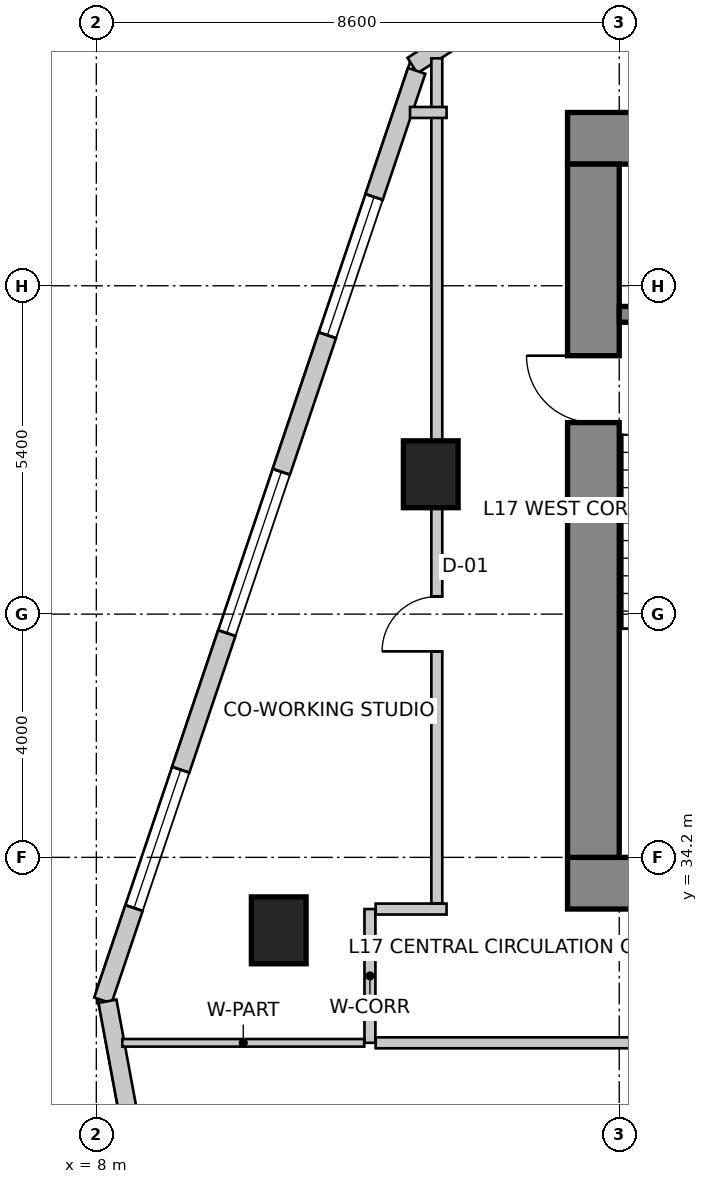
"""IFC4 building model, lengths in metres.
Left out: names, types, materials, properties, quantities, classifications, styles, units other than length and angle.
Written with IfcOpenShell. Run it as: python <this file> out.ifc"""

import sys

from ifc_helpers import new_model, si_unit, direction, frame, frame_2d, origin, origin_2d, place, context, subcontext, project, spatial, rectangle, extrude, source, transform, mapped, element, fill, save


model = new_model("IFC4")
c1 = context("Model", 3, precision=1e-05, world=origin(), true_north=direction((0.0, 1.0)))
c2 = subcontext(c1, "Body", "Model", "MODEL_VIEW")
j1 = project(units=[si_unit("LENGTHUNIT", "METRE"), si_unit("PLANEANGLEUNIT", "RADIAN")], contexts=[c1])
p1 = place(None, origin())
s1 = spatial("IfcSite", under=j1, at=p1, CompositionType="ELEMENT")
p2 = place(p1, origin())
s2 = spatial("IfcBuilding", under=s1, at=p2, CompositionType="ELEMENT")
p3 = place(p2, frame((0.0, 0.0, 71.0)))
s3 = spatial("IfcBuildingStorey", under=s2, at=p3, CompositionType="ELEMENT", Elevation=71.0)
p4 = place(p3, frame((15.75, 46.025, 0.0), z_axis=(0.0, 0.0, 1.0), x_axis=(1.0, 0.0, 0.0)))
e1 = element("IfcWall", 1, at=p4, inside=s3, PredefinedType="SHEAR", context=c2, shape_type="SweptSolid", body=[
    extrude(rectangle(XDim=16.1, YDim=0.85, at=frame_2d((8.05, 0.0))), origin(), (0.0, 0.0, 1.0), 4.0),
])
p5 = place(p3, frame((15.75, 33.775, 0.0), z_axis=(0.0, 0.0, 1.0), x_axis=(1.0, 0.0, 0.0)))
e2 = element("IfcWall", 2, at=p5, inside=s3, PredefinedType="SHEAR", context=c2, shape_type="SweptSolid", body=[
    extrude(rectangle(XDim=16.1, YDim=0.85, at=frame_2d((8.05, 0.0))), origin(), (0.0, 0.0, 1.0), 4.0),
])
m1 = source(origin(), c2, "Body", "SweptSolid", [
    extrude(rectangle(XDim=1.3, YDim=2.15, at=frame_2d((0.65, 1.075))), frame((0.0, 0.435, 0.0), z_axis=(0.0, -1.0, 0.0), x_axis=(1.0, 0.0, 0.0)), (0.0, 0.0, 1.0), 0.87),
])
p6 = place(p5, frame((10.18, 0.0, 0.0)))
e3 = element("IfcOpeningElement", 3, at=p6, cuts=e2, PredefinedType="OPENING", context=c2, shape_type="MappedRepresentation", body=[
    mapped(m1, transform((0.0, 0.0, 0.0), scale=1.0)),
])
p7 = place(p3, frame((16.175, 34.2, 0.0), z_axis=(0.0, 0.0, 1.0), x_axis=(0.0, 1.0, 0.0)))
e4 = element("IfcWall", 4, at=p7, inside=s3, PredefinedType="SHEAR", context=c2, shape_type="SweptSolid", body=[
    extrude(rectangle(XDim=11.4, YDim=0.85, at=frame_2d((5.7, 0.0))), origin(), (0.0, 0.0, 1.0), 4.0),
])
m2 = source(origin(), c2, "Body", "SweptSolid", [
    extrude(rectangle(XDim=1.1, YDim=2.15, at=frame_2d((0.55, 1.075))), frame((0.0, 0.435, 0.0), z_axis=(0.0, -1.0, 0.0), x_axis=(1.0, 0.0, 0.0)), (0.0, 0.0, 1.0), 0.87),
])
p8 = place(p7, frame((7.15, 0.0, 0.0)))
e5 = element("IfcOpeningElement", 5, at=p8, cuts=e4, PredefinedType="OPENING", context=c2, shape_type="MappedRepresentation", body=[
    mapped(m2, transform((0.0, 0.0, 0.0), scale=1.0)),
])
p9 = place(p3, frame((16.6, 43.13, 0.0), z_axis=(0.0, 0.0, 1.0), x_axis=(1.0, 0.0, 0.0)))
e6 = element("IfcWall", 6, at=p9, inside=s3, PredefinedType="SHEAR", context=c2, shape_type="SweptSolid", body=[
    extrude(rectangle(XDim=3.5, YDim=0.26, at=frame_2d((1.75, 0.0))), origin(), (0.0, 0.0, 1.0), 4.0),
])
m3 = source(origin(), c2, "Body", "SweptSolid", [
    extrude(rectangle(XDim=0.9, YDim=1.1, at=origin_2d()), origin(), (0.0, 0.0, 1.0), 4.0),
])
for number, where, z_axis, x_axis in (
    (7, (11.0, 33.0, 0.0), (0.0, 0.0, 1.0), (1.0, 0.0, 0.0)),
    (8, (13.5, 40.5, 0.0), (0.0, 0.0, 1.0), (1.0, 0.0, 0.0)),
):
    element("IfcColumn", number, at=place(p3, frame(where, z_axis=z_axis, x_axis=x_axis)), inside=s3, PredefinedType="COLUMN", context=c2, shape_type="MappedRepresentation", body=[
        mapped(m3, transform((0.0, 0.0, 0.0), scale=1.0)),
    ])
p10 = place(p3, frame((21.875, 52.742, 0.0), z_axis=(0.0, 0.0, 1.0), x_axis=(-0.843662465249, -0.536873956092, 0.0)))
e9 = element("IfcWall", 9, at=p10, inside=s3, PredefinedType="SOLIDWALL", context=c2, shape_type="SweptSolid", body=[
    extrude(rectangle(XDim=10.284, YDim=0.3, at=frame_2d((5.142, 0.0))), origin(), (0.0, 0.0, 1.0), 3.75),
])
m4 = source(origin(), c2, "Body", "SweptSolid", [
    extrude(rectangle(XDim=1.2, YDim=1.6, at=frame_2d((0.6, 0.8))), frame((0.0, 0.16, 0.0), z_axis=(0.0, -1.0, 0.0), x_axis=(1.0, 0.0, 0.0)), (0.0, 0.0, 1.0), 0.32),
])
p11 = place(p10, frame((0.479, 0.0, 0.85)))
e10 = element("IfcOpeningElement", 10, at=p11, cuts=e9, PredefinedType="OPENING", context=c2, shape_type="MappedRepresentation", body=[
    mapped(m4, transform((0.0, 0.0, 0.0), scale=1.0)),
])
m5 = source(origin(), c2, "Body", "SweptSolid", [
    extrude(rectangle(XDim=2.8, YDim=2.4, at=frame_2d((1.4, 1.2))), frame((0.0, 0.16, 0.0), z_axis=(0.0, -1.0, 0.0), x_axis=(1.0, 0.0, 0.0)), (0.0, 0.0, 1.0), 0.32),
])
p12 = place(p10, frame((3.342, 0.0, 0.85)))
e11 = element("IfcOpeningElement", 11, at=p12, cuts=e9, PredefinedType="OPENING", context=c2, shape_type="MappedRepresentation", body=[
    mapped(m5, transform((0.0, 0.0, 0.0), scale=1.0)),
])
m6 = source(origin(), c2, "Body", "SweptSolid", [
    extrude(rectangle(XDim=1.8, YDim=2.1, at=frame_2d((0.9, 1.05))), frame((0.0, 0.16, 0.0), z_axis=(0.0, -1.0, 0.0), x_axis=(1.0, 0.0, 0.0)), (0.0, 0.0, 1.0), 0.32),
])
p13 = place(p10, frame((7.753, 0.0, 0.85)))
e12 = element("IfcOpeningElement", 12, at=p13, cuts=e9, PredefinedType="OPENING", context=c2, shape_type="MappedRepresentation", body=[
    mapped(m6, transform((0.0, 0.0, 0.0), scale=1.0)),
])
p14 = place(p3, frame((13.269, 47.134, 0.0), z_axis=(0.0, 0.0, 1.0), x_axis=(-0.319920423265, -0.947444416722, 0.0)))
e13 = element("IfcWall", 13, at=p14, inside=s3, PredefinedType="SOLIDWALL", context=c2, shape_type="SweptSolid", body=[
    extrude(rectangle(XDim=16.135, YDim=0.3, at=frame_2d((8.067, 0.0))), origin(), (0.0, 0.0, 1.0), 3.75),
])
m7 = source(origin(), c2, "Body", "SweptSolid", [
    extrude(rectangle(XDim=2.4, YDim=2.2, at=frame_2d((1.2, 1.1))), frame((0.0, 0.16, 0.0), z_axis=(0.0, -1.0, 0.0), x_axis=(1.0, 0.0, 0.0)), (0.0, 0.0, 1.0), 0.32),
])
p15 = place(p14, frame((2.188, 0.0, 0.85)))
e14 = element("IfcOpeningElement", 14, at=p15, cuts=e13, PredefinedType="OPENING", context=c2, shape_type="MappedRepresentation", body=[
    mapped(m7, transform((0.0, 0.0, 0.0), scale=1.0)),
])
p16 = place(p14, frame((6.959, 0.0, 0.85)))
e15 = element("IfcOpeningElement", 15, at=p16, cuts=e13, PredefinedType="OPENING", context=c2, shape_type="MappedRepresentation", body=[
    mapped(m5, transform((0.0, 0.0, 0.0), scale=1.0)),
])
p17 = place(p14, frame((12.13, 0.0, 0.85)))
e16 = element("IfcOpeningElement", 16, at=p17, cuts=e13, PredefinedType="OPENING", context=c2, shape_type="MappedRepresentation", body=[
    mapped(m7, transform((0.0, 0.0, 0.0), scale=1.0)),
])
p18 = place(p3, frame((8.183, 31.833, 0.0), z_axis=(0.0, 0.0, 1.0), x_axis=(0.18216364648, -0.983268226834, 0.0)))
e17 = element("IfcWall", 17, at=p18, inside=s3, PredefinedType="SOLIDWALL", context=c2, shape_type="SweptSolid", body=[
    extrude(rectangle(XDim=26.678, YDim=0.3, at=frame_2d((13.339, 0.0))), origin(), (0.0, 0.0, 1.0), 3.75),
])
m8 = source(origin(), c2, "Body", "SweptSolid", [
    extrude(rectangle(XDim=1.6, YDim=2.15, at=frame_2d((0.8, 1.075))), frame((0.0, 0.16, 0.0), z_axis=(0.0, -1.0, 0.0), x_axis=(1.0, 0.0, 0.0)), (0.0, 0.0, 1.0), 0.32),
])
p19 = place(p18, frame((9.427, 0.0, 0.0)))
e18 = element("IfcOpeningElement", 18, at=p19, cuts=e17, PredefinedType="OPENING", context=c2, shape_type="MappedRepresentation", body=[
    mapped(m8, transform((0.0, 0.0, 0.0), scale=1.0)),
])
p20 = place(p18, frame((3.642, 0.0, 0.85)))
e19 = element("IfcOpeningElement", 19, at=p20, cuts=e17, PredefinedType="OPENING", context=c2, shape_type="MappedRepresentation", body=[
    mapped(m5, transform((0.0, 0.0, 0.0), scale=1.0)),
])
p21 = place(p18, frame((13.647, 0.0, 0.85)))
e20 = element("IfcOpeningElement", 20, at=p21, cuts=e17, PredefinedType="OPENING", context=c2, shape_type="MappedRepresentation", body=[
    mapped(m5, transform((0.0, 0.0, 0.0), scale=1.0)),
])
p22 = place(p18, frame((18.372, 0.0, 0.85)))
e21 = element("IfcOpeningElement", 21, at=p22, cuts=e17, PredefinedType="OPENING", context=c2, shape_type="MappedRepresentation", body=[
    mapped(m7, transform((0.0, 0.0, 0.0), scale=1.0)),
])
p23 = place(p18, frame((22.696, 0.0, 0.85)))
e22 = element("IfcOpeningElement", 22, at=p23, cuts=e17, PredefinedType="OPENING", context=c2, shape_type="MappedRepresentation", body=[
    mapped(m5, transform((0.0, 0.0, 0.0), scale=1.0)),
])
p24 = place(p3, frame((12.5, 31.15, 0.0), z_axis=(0.0, 0.0, 1.0), x_axis=(0.0, 1.0, 0.0)))
e23 = element("IfcWall", 23, at=p24, inside=s3, PredefinedType="PARTITIONING", context=c2, shape_type="SweptSolid", body=[
    extrude(rectangle(XDim=2.2, YDim=0.18, at=frame_2d((1.1, 0.0))), origin(), (0.0, 0.0, 1.0), 3.434),
])
p25 = place(p3, frame((12.594, 33.35, 0.0), z_axis=(0.0, 0.0, 1.0), x_axis=(1.0, 0.0, 0.0)))
e24 = element("IfcWall", 24, at=p25, inside=s3, PredefinedType="PARTITIONING", context=c2, shape_type="SweptSolid", body=[
    extrude(rectangle(XDim=1.166, YDim=0.18, at=frame_2d((0.583, 0.0))), origin(), (0.0, 0.0, 1.0), 3.75),
])
p26 = place(p3, frame((26.76, 31.15, 0.0), z_axis=(0.0, 0.0, 1.0), x_axis=(-1.0, 0.0, 0.0)))
e25 = element("IfcWall", 25, at=p26, inside=s3, PredefinedType="PARTITIONING", context=c2, shape_type="SweptSolid", body=[
    extrude(rectangle(XDim=14.166, YDim=0.18, at=frame_2d((7.083, 0.0))), origin(), (0.0, 0.0, 1.0), 3.434),
])
m9 = source(origin(), c2, "Body", "SweptSolid", [
    extrude(rectangle(XDim=1.4, YDim=2.15, at=frame_2d((0.7, 1.075))), frame((0.0, 0.1, 0.0), z_axis=(0.0, -1.0, 0.0), x_axis=(1.0, 0.0, 0.0)), (0.0, 0.0, 1.0), 0.2),
])
p27 = place(p26, frame((6.323, 0.0, 0.0)))
e26 = element("IfcOpeningElement", 26, at=p27, cuts=e25, PredefinedType="OPENING", context=c2, shape_type="MappedRepresentation", body=[
    mapped(m9, transform((0.0, 0.0, 0.0), scale=1.0)),
])
p28 = place(p3, frame((13.6, 33.444, 0.0), z_axis=(0.0, 0.0, 1.0), x_axis=(0.0, 1.0, 0.0)))
e27 = element("IfcWall", 27, at=p28, inside=s3, PredefinedType="PARTITIONING", context=c2, shape_type="SweptSolid", body=[
    extrude(rectangle(XDim=13.896, YDim=0.18, at=frame_2d((6.948, 0.0))), origin(), (0.0, 0.0, 1.0), 2.892),
])
m10 = source(origin(), c2, "Body", "SweptSolid", [
    extrude(rectangle(XDim=0.9, YDim=2.15, at=frame_2d((0.45, 1.075))), frame((0.0, 0.1, 0.0), z_axis=(0.0, -1.0, 0.0), x_axis=(1.0, 0.0, 0.0)), (0.0, 0.0, 1.0), 0.2),
])
p29 = place(p28, frame((4.144, 0.0, 0.0)))
e28 = element("IfcOpeningElement", 28, at=p29, cuts=e27, PredefinedType="OPENING", context=c2, shape_type="MappedRepresentation", body=[
    mapped(m10, transform((0.0, 0.0, 0.0), scale=1.0)),
])
p30 = place(p3, frame((13.76, 46.45, 0.0), z_axis=(0.0, 0.0, 1.0), x_axis=(-1.0, 0.0, 0.0)))
e29 = element("IfcWall", 29, at=p30, inside=s3, PredefinedType="PARTITIONING", context=c2, shape_type="SweptSolid", body=[
    extrude(rectangle(XDim=0.601, YDim=0.18, at=frame_2d((0.301, 0.0))), origin(), (0.0, 0.0, 1.0), 3.75),
])
p31 = place(p3, frame((12.406, 31.15, 0.0), z_axis=(0.0, 0.0, 1.0), x_axis=(-1.0, 0.0, 0.0)))
e30 = element("IfcWall", 30, at=p31, inside=s3, PredefinedType="PARTITIONING", context=c2, shape_type="SweptSolid", body=[
    extrude(rectangle(XDim=3.979, YDim=0.125, at=frame_2d((1.99, 0.0))), origin(), (0.0, 0.0, 1.0), 2.892),
])
m11 = source(origin(), c2, "Body", "SweptSolid", [
    extrude(rectangle(XDim=2.4, YDim=2.2, at=frame_2d((1.2, 1.1))), frame((0.0, -0.015, 0.0), z_axis=(0.0, -1.0, 0.0), x_axis=(1.0, 0.0, 0.0)), (0.0, 0.0, 1.0), 0.06),
])
p32 = place(p15, origin())
e31 = element("IfcWindow", 31, at=p32, inside=s3, PartitioningType="SINGLE_PANEL", PredefinedType="WINDOW", context=c2, shape_type="MappedRepresentation", body=[
    mapped(m11, transform((0.0, 0.0, 0.0), scale=1.0)),
])
fill(e14, e31)
m12 = source(origin(), c2, "Body", "SweptSolid", [
    extrude(rectangle(XDim=2.8, YDim=2.4, at=frame_2d((1.4, 1.2))), frame((0.0, -0.015, 0.0), z_axis=(0.0, -1.0, 0.0), x_axis=(1.0, 0.0, 0.0)), (0.0, 0.0, 1.0), 0.06),
])
p33 = place(p16, origin())
e32 = element("IfcWindow", 32, at=p33, inside=s3, PartitioningType="SINGLE_PANEL", PredefinedType="WINDOW", context=c2, shape_type="MappedRepresentation", body=[
    mapped(m12, transform((0.0, 0.0, 0.0), scale=1.0)),
])
fill(e15, e32)
p34 = place(p17, origin())
e33 = element("IfcWindow", 33, at=p34, inside=s3, PartitioningType="SINGLE_PANEL", PredefinedType="WINDOW", context=c2, shape_type="MappedRepresentation", body=[
    mapped(m11, transform((0.0, 0.0, 0.0), scale=1.0)),
])
fill(e16, e33)
m13 = source(origin(), c2, "Body", "SweptSolid", [
    extrude(rectangle(XDim=1.1, YDim=2.15, at=frame_2d((0.55, 1.075))), frame((0.0, 0.025, 0.0), z_axis=(0.0, -1.0, 0.0), x_axis=(1.0, 0.0, 0.0)), (0.0, 0.0, 1.0), 0.05),
])
p35 = place(p8, origin())
e34 = element("IfcDoor", 34, at=p35, inside=s3, OperationType="SINGLE_SWING_RIGHT", PredefinedType="DOOR", context=c2, shape_type="MappedRepresentation", body=[
    mapped(m13, transform((0.0, 0.0, 0.0), scale=1.0)),
])
fill(e5, e34)
m14 = source(origin(), c2, "Body", "SweptSolid", [
    extrude(rectangle(XDim=0.9, YDim=2.15, at=frame_2d((0.45, 1.075))), frame((0.0, 0.025, 0.0), z_axis=(0.0, -1.0, 0.0), x_axis=(1.0, 0.0, 0.0)), (0.0, 0.0, 1.0), 0.05),
])
p36 = place(p29, origin())
e35 = element("IfcDoor", 35, at=p36, inside=s3, OperationType="SINGLE_SWING_LEFT", PredefinedType="DOOR", context=c2, shape_type="MappedRepresentation", body=[
    mapped(m14, transform((0.0, 0.0, 0.0), scale=1.0)),
])
fill(e28, e35)
save(model, sys.argv[1])
